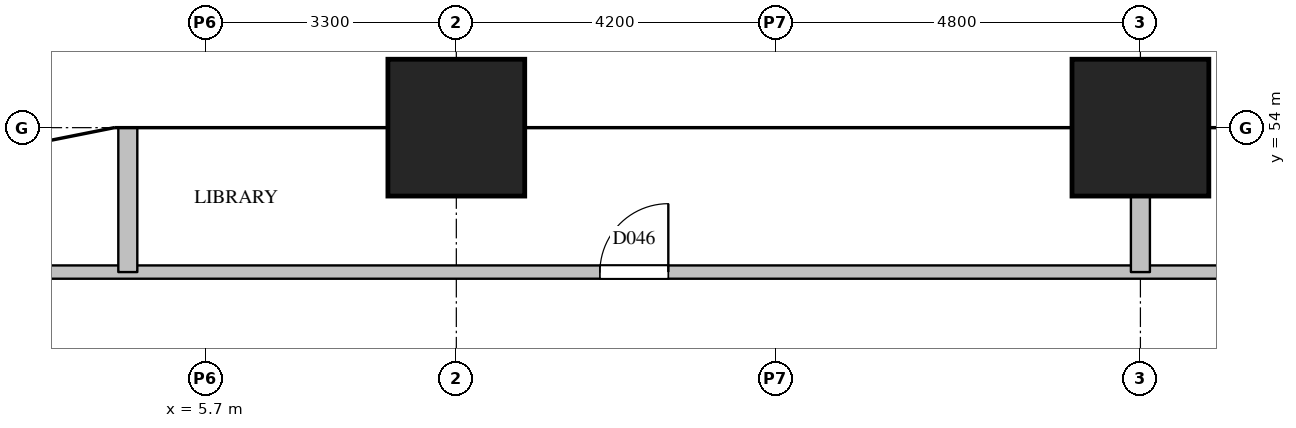
"""IFC4 building model, lengths in metres.
Left out: names, types, materials, properties, quantities, classifications, styles, units other than length and angle.
Written with IfcOpenShell. Run it as: python <this file> out.ifc"""

import sys

from ifc_helpers import new_model, si_unit, direction, frame, frame_2d, origin, origin_2d, place, context, subcontext, project, spatial, rectangle, extrude, element, fill, save


model = new_model("IFC4")
c1 = context("Model", 3, precision=1e-05, world=origin(), true_north=direction((0.0, 1.0)))
c2 = subcontext(c1, "Body", "Model", "MODEL_VIEW")
j1 = project(units=[si_unit("LENGTHUNIT", "METRE"), si_unit("PLANEANGLEUNIT", "RADIAN")], contexts=[c1])
p1 = place(None, origin())
s1 = spatial("IfcSite", under=j1, at=p1, CompositionType="ELEMENT")
p2 = place(p1, origin())
s2 = spatial("IfcBuilding", under=s1, at=p2, CompositionType="ELEMENT")
p3 = place(p2, frame((0.0, 0.0, 69.0)))
s3 = spatial("IfcBuildingStorey", under=s2, at=p3, CompositionType="ELEMENT", Elevation=69.0)
for number, where, z_axis, x_axis in (
    (1, (9.0, 54.0, 0.0), (0.0, 0.0, 1.0), (1.0, 0.0, 0.0)),
    (2, (18.0, 54.0, 0.0), (0.0, 0.0, 1.0), (1.0, 0.0, 0.0)),
):
    element("IfcColumn", number, at=place(p3, frame(where, z_axis=z_axis, x_axis=x_axis)), inside=s3, PredefinedType="COLUMN", context=c2, shape_type="SweptSolid", body=[
        extrude(rectangle(XDim=1.8, YDim=1.8, at=origin_2d()), origin(), (0.0, 0.0, 1.0), 3.8),
    ])
p4 = place(p3, frame((3.5, 52.1, 0.0), z_axis=(0.0, 0.0, 1.0), x_axis=(1.0, 0.0, 0.0)))
e3 = element("IfcWall", 3, at=p4, inside=s3, PredefinedType="PARTITIONING", context=c2, shape_type="SweptSolid", body=[
    extrude(rectangle(XDim=16.6, YDim=0.175, at=frame_2d((8.3, 0.0))), origin(), (0.0, 0.0, 1.0), 3.5),
])
p5 = place(p4, frame((7.389, 0.0, 0.0)))
e4 = element("IfcOpeningElement", 4, at=p5, cuts=e3, PredefinedType="OPENING", context=c2, shape_type="SweptSolid", body=[
    extrude(rectangle(XDim=0.9, YDim=2.1, at=frame_2d((0.45, 1.05))), frame((0.0, 0.097, 0.0), z_axis=(0.0, -1.0, 0.0), x_axis=(1.0, 0.0, 0.0)), (0.0, 0.0, 1.0), 0.195),
])
p6 = place(p3, frame((4.678, 52.1, 0.0), z_axis=(0.0, 0.0, 1.0), x_axis=(0.0, 1.0, 0.0)))
e5 = element("IfcWall", 5, at=p6, inside=s3, PredefinedType="PARTITIONING", context=c2, shape_type="SweptSolid", body=[
    extrude(rectangle(XDim=1.9, YDim=0.25, at=frame_2d((0.95, 0.0))), origin(), (0.0, 0.0, 1.0), 2.5),
])
p7 = place(p3, frame((18.0, 52.1, 0.0), z_axis=(0.0, 0.0, 1.0), x_axis=(0.0, 1.0, 0.0)))
e6 = element("IfcWall", 6, at=p7, inside=s3, PredefinedType="PARTITIONING", context=c2, shape_type="SweptSolid", body=[
    extrude(rectangle(XDim=1.9, YDim=0.25, at=frame_2d((0.95, 0.0))), origin(), (0.0, 0.0, 1.0), 3.5),
])
p8 = place(p5, origin())
e7 = element("IfcDoor", 7, at=p8, inside=s3, OperationType="SINGLE_SWING_RIGHT", PredefinedType="DOOR", context=c2, shape_type="SweptSolid", body=[
    extrude(rectangle(XDim=0.9, YDim=2.1, at=frame_2d((0.45, 1.05))), frame((0.0, 0.025, 0.0), z_axis=(0.0, -1.0, 0.0), x_axis=(1.0, 0.0, 0.0)), (0.0, 0.0, 1.0), 0.05),
])
fill(e4, e7)
save(model, sys.argv[1])
